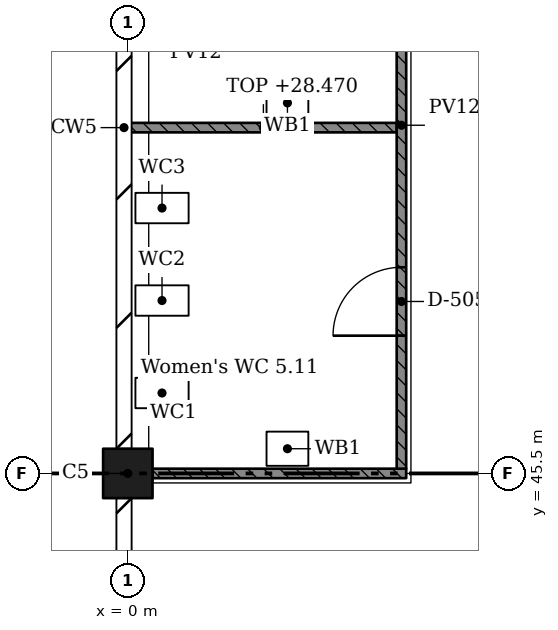
"""IFC4 building model, lengths in metres.
Left out: names, types, materials, properties, quantities, classifications, styles, units other than length and angle.
Written with IfcOpenShell. Run it as: python <this file> out.ifc"""

import sys

from ifc_helpers import new_model, si_unit, direction, frame, frame_2d, origin, origin_2d, place, context, subcontext, project, spatial, rectangle, extrude, element, fill, save


model = new_model("IFC4")
c1 = context("Model", 3, precision=1e-05, world=origin(), true_north=direction((0.0, 1.0)))
c2 = subcontext(c1, "Body", "Model", "MODEL_VIEW")
j1 = project(units=[si_unit("LENGTHUNIT", "METRE"), si_unit("PLANEANGLEUNIT", "RADIAN")], contexts=[c1])
p1 = place(None, origin())
s1 = spatial("IfcSite", under=j1, at=p1, CompositionType="ELEMENT")
p2 = place(p1, origin())
s2 = spatial("IfcBuilding", under=s1, at=p2, CompositionType="ELEMENT")
p3 = place(p2, frame((0.0, 0.0, 24.57)))
s3 = spatial("IfcBuildingStorey", under=s2, at=p3, CompositionType="ELEMENT", Elevation=24.57)
p4 = place(p3, frame((0.0, 45.5, 0.0), z_axis=(0.0, 0.0, 1.0), x_axis=(1.0, 0.0, 0.0)))
e1 = element("IfcColumn", 1, at=p4, inside=s3, PredefinedType="COLUMN", context=c2, shape_type="SweptSolid", body=[
    extrude(rectangle(XDim=0.65, YDim=0.65, at=origin_2d()), origin(), (0.0, 0.0, 1.0), 4.55),
])
p5 = place(p3, frame((0.03, 50.05, 0.0), z_axis=(0.0, 0.0, 1.0), x_axis=(1.0, 0.0, 0.0)))
e2 = element("IfcWall", 2, at=p5, inside=s3, PredefinedType="PARTITIONING", context=c2, shape_type="SweptSolid", body=[
    extrude(rectangle(XDim=3.508, YDim=0.125, at=frame_2d((1.754, 0.0))), origin(), (0.0, 0.0, 1.0), 3.9),
])
p6 = place(p3, frame((0.325, 45.5, 0.0), z_axis=(0.0, 0.0, 1.0), x_axis=(1.0, 0.0, 0.0)))
e3 = element("IfcWall", 3, at=p6, inside=s3, PredefinedType="PARTITIONING", context=c2, shape_type="SweptSolid", body=[
    extrude(rectangle(XDim=3.338, YDim=0.125, at=frame_2d((1.669, 0.0))), origin(), (0.0, 0.0, 1.0), 3.9),
])
p7 = place(p3, frame((3.6, 45.562, 0.0), z_axis=(0.0, 0.0, 1.0), x_axis=(0.0, 1.0, 0.0)))
e4 = element("IfcWall", 4, at=p7, inside=s3, PredefinedType="PARTITIONING", context=c2, shape_type="SweptSolid", body=[
    extrude(rectangle(XDim=9.038, YDim=0.125, at=frame_2d((4.519, 0.0))), origin(), (0.0, 0.0, 1.0), 3.9),
])
p8 = place(p7, frame((1.75, 0.0, 0.0)))
e5 = element("IfcOpeningElement", 5, at=p8, cuts=e4, PredefinedType="OPENING", context=c2, shape_type="SweptSolid", body=[
    extrude(rectangle(XDim=0.9, YDim=2.1, at=frame_2d((0.45, 1.05))), frame((0.0, 0.073, 0.0), z_axis=(0.0, -1.0, 0.0), x_axis=(1.0, 0.0, 0.0)), (0.0, 0.0, 1.0), 0.145),
])
p9 = place(p7, frame((6.238, 0.0, 0.0)))
e6 = element("IfcOpeningElement", 6, at=p9, cuts=e4, PredefinedType="OPENING", context=c2, shape_type="SweptSolid", body=[
    extrude(rectangle(XDim=1.0, YDim=2.1, at=frame_2d((0.5, 1.05))), frame((0.0, 0.073, 0.0), z_axis=(0.0, -1.0, 0.0), x_axis=(1.0, 0.0, 0.0)), (0.0, 0.0, 1.0), 0.145),
])
p10 = place(p8, origin())
e7 = element("IfcDoor", 7, at=p10, inside=s3, OperationType="SINGLE_SWING_RIGHT", PredefinedType="DOOR", context=c2, shape_type="SweptSolid", body=[
    extrude(rectangle(XDim=0.9, YDim=2.1, at=frame_2d((0.45, 1.05))), frame((0.0, 0.025, 0.0), z_axis=(0.0, -1.0, 0.0), x_axis=(1.0, 0.0, 0.0)), (0.0, 0.0, 1.0), 0.05),
])
fill(e5, e7)
save(model, sys.argv[1])
